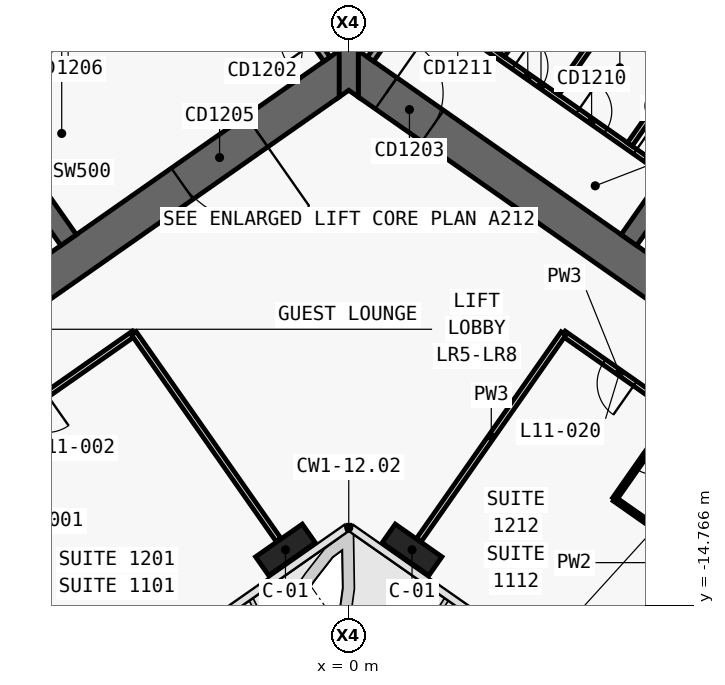
"""IFC4 building model, lengths in metres.
Left out: names, types, materials, properties, quantities, classifications, styles, units other than length and angle.
Written with IfcOpenShell. Run it as: python <this file> out.ifc"""

import sys

from ifc_helpers import new_model, si_unit, direction, frame, frame_2d, origin, origin_2d, place, context, subcontext, project, spatial, polyline, rectangle, outline, extrude, element, fill, save


model = new_model("IFC4")
c1 = context("Model", 3, precision=1e-05, world=origin(), true_north=direction((0.0, 1.0)))
c2 = subcontext(c1, "Body", "Model", "MODEL_VIEW")
j1 = project(units=[si_unit("LENGTHUNIT", "METRE"), si_unit("PLANEANGLEUNIT", "RADIAN")], contexts=[c1])
p1 = place(None, origin())
s1 = spatial("IfcSite", under=j1, at=p1, CompositionType="ELEMENT")
p2 = place(p1, origin())
s2 = spatial("IfcBuilding", under=s1, at=p2, CompositionType="ELEMENT")
p3 = place(p2, frame((0.0, 0.0, 65.3)))
s3 = spatial("IfcBuildingStorey", under=s2, at=p3, CompositionType="ELEMENT", Elevation=65.3)
p4 = place(p3, frame((0.037, 11.867, 0.0), z_axis=(0.0, 0.0, 1.0), x_axis=(-0.819155306259, -0.573571777746, 0.0)))
e1 = element("IfcWall", 1, at=p4, inside=s3, PredefinedType="SHEAR", context=c2, shape_type="SweptSolid", body=[
    extrude(outline(polyline([(33.837, 0.5), (0.7, 0.5), (0.0, -0.5), (33.837, -0.5), (33.837, 0.5)])), origin(), (0.0, 0.0, 1.0), 3.6),
])
p5 = place(p3, frame((0.037, -0.585, 0.0), z_axis=(0.0, 0.0, 1.0), x_axis=(-0.819157152511, -0.573569140985, 0.0)))
e2 = element("IfcWall", 2, at=p5, inside=s3, PredefinedType="SHEAR", context=c2, shape_type="SweptSolid", body=[
    extrude(outline(polyline([(26.695, 0.5), (0.7, 0.5), (0.0, -0.5), (26.695, -0.5), (26.695, 0.5)])), origin(), (0.0, 0.0, 1.0), 3.6),
])
p6 = place(p5, frame((2.995, 0.0, 0.0)))
e3 = element("IfcOpeningElement", 3, at=p6, cuts=e2, PredefinedType="OPENING", context=c2, shape_type="SweptSolid", body=[
    extrude(rectangle(XDim=2.4, YDim=2.1, at=frame_2d((1.2, 1.05))), frame((0.0, 0.51, 0.0), z_axis=(0.0, -1.0, 0.0), x_axis=(1.0, 0.0, 0.0)), (0.0, 0.0, 1.0), 1.02),
])
p7 = place(p5, frame((11.995, 0.0, 0.0)))
e4 = element("IfcOpeningElement", 4, at=p7, cuts=e2, PredefinedType="OPENING", context=c2, shape_type="SweptSolid", body=[
    extrude(rectangle(XDim=2.4, YDim=2.1, at=frame_2d((1.2, 1.05))), frame((0.0, 0.51, 0.0), z_axis=(0.0, -1.0, 0.0), x_axis=(1.0, 0.0, 0.0)), (0.0, 0.0, 1.0), 1.02),
])
p8 = place(p3, frame((-7.372, -5.162, 0.0), z_axis=(0.0, 0.0, 1.0), x_axis=(-0.573594173421, 0.819139624372, 0.0)))
e5 = element("IfcWall", 5, at=p8, inside=s3, PredefinedType="SHEAR", context=c2, shape_type="SweptSolid", body=[
    extrude(outline(polyline([(4.35, 0.25), (0.0, 0.25), (0.0, -0.25), (4.35, -0.25), (4.35, 0.25)])), origin(), (0.0, 0.0, 1.0), 3.6),
])
p9 = place(p3, frame((-2.638, 3.768, 0.0), z_axis=(0.0, 0.0, 1.0), x_axis=(-0.819148977158, -0.573580816643, 0.0)))
e6 = element("IfcWall", 6, at=p9, inside=s3, PredefinedType="SHEAR", context=c2, shape_type="SweptSolid", body=[
    extrude(outline(polyline([(26.0, 0.25), (0.0, 0.25), (0.0, -0.25), (26.0, -0.25), (26.0, 0.25)])), origin(), (0.0, 0.0, 1.0), 3.6),
])
p10 = place(p9, frame((1.169, 0.0, 0.0)))
e7 = element("IfcOpeningElement", 7, at=p10, cuts=e6, PredefinedType="OPENING", context=c2, shape_type="SweptSolid", body=[
    extrude(rectangle(XDim=1.1, YDim=2.1, at=frame_2d((0.55, 1.05))), frame((0.0, 0.26, 0.0), z_axis=(0.0, -1.0, 0.0), x_axis=(1.0, 0.0, 0.0)), (0.0, 0.0, 1.0), 0.52),
])
p11 = place(p9, frame((3.206, 0.0, 0.0)))
e8 = element("IfcOpeningElement", 8, at=p11, cuts=e6, PredefinedType="OPENING", context=c2, shape_type="SweptSolid", body=[
    extrude(rectangle(XDim=1.1, YDim=2.1, at=frame_2d((0.55, 1.05))), frame((0.0, 0.26, 0.0), z_axis=(0.0, -1.0, 0.0), x_axis=(1.0, 0.0, 0.0)), (0.0, 0.0, 1.0), 0.52),
])
p12 = place(p9, frame((5.244, 0.0, 0.0)))
e9 = element("IfcOpeningElement", 9, at=p12, cuts=e6, PredefinedType="OPENING", context=c2, shape_type="SweptSolid", body=[
    extrude(rectangle(XDim=1.1, YDim=2.1, at=frame_2d((0.55, 1.05))), frame((0.0, 0.26, 0.0), z_axis=(0.0, -1.0, 0.0), x_axis=(1.0, 0.0, 0.0)), (0.0, 0.0, 1.0), 0.52),
])
p13 = place(p9, frame((7.281, 0.0, 0.0)))
e10 = element("IfcOpeningElement", 10, at=p13, cuts=e6, PredefinedType="OPENING", context=c2, shape_type="SweptSolid", body=[
    extrude(rectangle(XDim=1.1, YDim=2.1, at=frame_2d((0.55, 1.05))), frame((0.0, 0.26, 0.0), z_axis=(0.0, -1.0, 0.0), x_axis=(1.0, 0.0, 0.0)), (0.0, 0.0, 1.0), 0.52),
])
p14 = place(p9, frame((9.688, 0.0, 0.0)))
e11 = element("IfcOpeningElement", 11, at=p14, cuts=e6, PredefinedType="OPENING", context=c2, shape_type="SweptSolid", body=[
    extrude(rectangle(XDim=1.1, YDim=2.1, at=frame_2d((0.55, 1.05))), frame((0.0, 0.26, 0.0), z_axis=(0.0, -1.0, 0.0), x_axis=(1.0, 0.0, 0.0)), (0.0, 0.0, 1.0), 0.52),
])
p15 = place(p9, frame((11.863, 0.0, 0.0)))
e12 = element("IfcOpeningElement", 12, at=p15, cuts=e6, PredefinedType="OPENING", context=c2, shape_type="SweptSolid", body=[
    extrude(rectangle(XDim=1.1, YDim=2.1, at=frame_2d((0.55, 1.05))), frame((0.0, 0.26, 0.0), z_axis=(0.0, -1.0, 0.0), x_axis=(1.0, 0.0, 0.0)), (0.0, 0.0, 1.0), 0.52),
])
p16 = place(p9, frame((14.038, 0.0, 0.0)))
e13 = element("IfcOpeningElement", 13, at=p16, cuts=e6, PredefinedType="OPENING", context=c2, shape_type="SweptSolid", body=[
    extrude(rectangle(XDim=1.1, YDim=2.1, at=frame_2d((0.55, 1.05))), frame((0.0, 0.26, 0.0), z_axis=(0.0, -1.0, 0.0), x_axis=(1.0, 0.0, 0.0)), (0.0, 0.0, 1.0), 0.52),
])
p17 = place(p9, frame((16.212, 0.0, 0.0)))
e14 = element("IfcOpeningElement", 14, at=p17, cuts=e6, PredefinedType="OPENING", context=c2, shape_type="SweptSolid", body=[
    extrude(rectangle(XDim=1.1, YDim=2.1, at=frame_2d((0.55, 1.05))), frame((0.0, 0.26, 0.0), z_axis=(0.0, -1.0, 0.0), x_axis=(1.0, 0.0, 0.0)), (0.0, 0.0, 1.0), 0.52),
])
p18 = place(p3, frame((-0.037, 11.867, 0.0), z_axis=(0.0, 0.0, 1.0), x_axis=(0.819155306259, -0.573571777746, 0.0)))
e15 = element("IfcWall", 15, at=p18, inside=s3, PredefinedType="SHEAR", context=c2, shape_type="SweptSolid", body=[
    extrude(outline(polyline([(33.837, 0.5), (0.0, 0.5), (0.7, -0.5), (33.837, -0.5), (33.837, 0.5)])), origin(), (0.0, 0.0, 1.0), 3.6),
])
p19 = place(p3, frame((-0.037, -0.585, 0.0), z_axis=(0.0, 0.0, 1.0), x_axis=(0.819157152511, -0.573569140985, 0.0)))
e16 = element("IfcWall", 16, at=p19, inside=s3, PredefinedType="SHEAR", context=c2, shape_type="SweptSolid", body=[
    extrude(outline(polyline([(26.695, 0.5), (0.0, 0.5), (0.7, -0.5), (26.695, -0.5), (26.695, 0.5)])), origin(), (0.0, 0.0, 1.0), 3.6),
])
p20 = place(p19, frame((1.245, 0.0, 0.0)))
e17 = element("IfcOpeningElement", 17, at=p20, cuts=e16, PredefinedType="OPENING", context=c2, shape_type="SweptSolid", body=[
    extrude(rectangle(XDim=1.5, YDim=2.1, at=frame_2d((0.75, 1.05))), frame((0.0, 0.51, 0.0), z_axis=(0.0, -1.0, 0.0), x_axis=(1.0, 0.0, 0.0)), (0.0, 0.0, 1.0), 1.02),
])
p21 = place(p19, frame((12.445, 0.0, 0.0)))
e18 = element("IfcOpeningElement", 18, at=p21, cuts=e16, PredefinedType="OPENING", context=c2, shape_type="SweptSolid", body=[
    extrude(rectangle(XDim=1.5, YDim=2.1, at=frame_2d((0.75, 1.05))), frame((0.0, 0.51, 0.0), z_axis=(0.0, -1.0, 0.0), x_axis=(1.0, 0.0, 0.0)), (0.0, 0.0, 1.0), 1.02),
])
p22 = place(p3, frame((7.372, -5.162, 0.0), z_axis=(0.0, 0.0, 1.0), x_axis=(0.573594173421, 0.819139624372, 0.0)))
e19 = element("IfcWall", 19, at=p22, inside=s3, PredefinedType="SHEAR", context=c2, shape_type="SweptSolid", body=[
    extrude(outline(polyline([(0.0, 0.25), (0.0, -0.25), (4.35, -0.25), (4.35, 0.25), (0.0, 0.25)])), origin(), (0.0, 0.0, 1.0), 3.6),
])
p23 = place(p3, frame((2.638, 3.768, 0.0), z_axis=(0.0, 0.0, 1.0), x_axis=(0.819148977158, -0.573580816643, 0.0)))
e20 = element("IfcWall", 20, at=p23, inside=s3, PredefinedType="SHEAR", context=c2, shape_type="SweptSolid", body=[
    extrude(outline(polyline([(0.0, 0.25), (0.0, -0.25), (26.0, -0.25), (26.0, 0.25), (0.0, 0.25)])), origin(), (0.0, 0.0, 1.0), 3.6),
])
p24 = place(p23, frame((9.637, 0.0, 0.0)))
e21 = element("IfcOpeningElement", 21, at=p24, cuts=e20, PredefinedType="OPENING", context=c2, shape_type="SweptSolid", body=[
    extrude(rectangle(XDim=1.2, YDim=2.1, at=frame_2d((0.6, 1.05))), frame((0.0, 0.26, 0.0), z_axis=(0.0, -1.0, 0.0), x_axis=(1.0, 0.0, 0.0)), (0.0, 0.0, 1.0), 0.52),
])
p25 = place(p23, frame((11.812, 0.0, 0.0)))
e22 = element("IfcOpeningElement", 22, at=p25, cuts=e20, PredefinedType="OPENING", context=c2, shape_type="SweptSolid", body=[
    extrude(rectangle(XDim=1.2, YDim=2.1, at=frame_2d((0.6, 1.05))), frame((0.0, 0.26, 0.0), z_axis=(0.0, -1.0, 0.0), x_axis=(1.0, 0.0, 0.0)), (0.0, 0.0, 1.0), 0.52),
])
p26 = place(p23, frame((13.988, 0.0, 0.0)))
e23 = element("IfcOpeningElement", 23, at=p26, cuts=e20, PredefinedType="OPENING", context=c2, shape_type="SweptSolid", body=[
    extrude(rectangle(XDim=1.2, YDim=2.1, at=frame_2d((0.6, 1.05))), frame((0.0, 0.26, 0.0), z_axis=(0.0, -1.0, 0.0), x_axis=(1.0, 0.0, 0.0)), (0.0, 0.0, 1.0), 0.52),
])
p27 = place(p23, frame((16.262, 0.0, 0.0)))
e24 = element("IfcOpeningElement", 24, at=p27, cuts=e20, PredefinedType="OPENING", context=c2, shape_type="SweptSolid", body=[
    extrude(rectangle(XDim=1.0, YDim=2.1, at=frame_2d((0.5, 1.05))), frame((0.0, 0.26, 0.0), z_axis=(0.0, -1.0, 0.0), x_axis=(1.0, 0.0, 0.0)), (0.0, 0.0, 1.0), 0.52),
])
p28 = place(p3, frame((0.0, -1.396, 0.0), z_axis=(0.0, 0.0, 1.0), x_axis=(0.0, 1.0, 0.0)))
e25 = element("IfcWall", 25, at=p28, inside=s3, PredefinedType="SHEAR", context=c2, shape_type="SweptSolid", body=[
    extrude(outline(polyline([(0.0, -0.25), (0.175, -0.25), (1.221, -0.25), (12.452, -0.25), (13.848, -0.25), (13.857, -0.25), (13.968, -0.172), (13.848, 0.0), (13.968, 0.172), (13.857, 0.25), (13.848, 0.25), (12.452, 0.25), (1.221, 0.25), (0.175, 0.25), (0.0, 0.25), (0.175, 0.0), (0.0, -0.25)])), origin(), (0.0, 0.0, 1.0), 3.6),
])
for number, where, z_axis, x_axis in (
    (26, (-1.665, -13.313, 0.0), (0.0, 0.0, 1.0), (-0.819, -0.574, 0.0)),
    (27, (1.665, -13.313, 0.0), (0.0, 0.0, 1.0), (0.819, -0.574, 0.0)),
):
    element("IfcColumn", number, at=place(p3, frame(where, z_axis=z_axis, x_axis=x_axis)), inside=s3, PredefinedType="COLUMN", context=c2, shape_type="SweptSolid", body=[
        extrude(rectangle(XDim=1.5, YDim=0.6, at=origin_2d()), origin(), (0.0, 0.0, 1.0), 3.6),
    ])
p29 = place(p3, frame((1.802, 1.179, 0.0), z_axis=(0.0, 0.0, 1.0), x_axis=(0.819142461705, -0.573590121456, 0.0)))
e28 = element("IfcWall", 28, at=p29, inside=s3, PredefinedType="PARTITIONING", context=c2, shape_type="SweptSolid", body=[
    extrude(rectangle(XDim=7.95, YDim=0.15, at=frame_2d((3.975, 0.0))), origin(), (0.0, 0.0, 1.0), 3.32),
])
p30 = place(p29, frame((0.85, 0.0, 0.0)))
e29 = element("IfcOpeningElement", 29, at=p30, cuts=e28, PredefinedType="OPENING", context=c2, shape_type="SweptSolid", body=[
    extrude(rectangle(XDim=0.9, YDim=2.1, at=frame_2d((0.45, 1.05))), frame((0.0, 0.085, 0.0), z_axis=(0.0, -1.0, 0.0), x_axis=(1.0, 0.0, 0.0)), (0.0, 0.0, 1.0), 0.17),
])
p31 = place(p29, frame((3.1, 0.0, 0.0)))
e30 = element("IfcOpeningElement", 30, at=p31, cuts=e28, PredefinedType="OPENING", context=c2, shape_type="SweptSolid", body=[
    extrude(rectangle(XDim=0.9, YDim=2.1, at=frame_2d((0.45, 1.05))), frame((0.0, 0.085, 0.0), z_axis=(0.0, -1.0, 0.0), x_axis=(1.0, 0.0, 0.0)), (0.0, 0.0, 1.0), 0.17),
])
p32 = place(p29, frame((5.15, 0.0, 0.0)))
e31 = element("IfcOpeningElement", 31, at=p32, cuts=e28, PredefinedType="OPENING", context=c2, shape_type="SweptSolid", body=[
    extrude(rectangle(XDim=0.9, YDim=2.1, at=frame_2d((0.45, 1.05))), frame((0.0, 0.085, 0.0), z_axis=(0.0, -1.0, 0.0), x_axis=(1.0, 0.0, 0.0)), (0.0, 0.0, 1.0), 0.17),
])
p33 = place(p29, frame((7.0, 0.0, 0.0)))
e32 = element("IfcOpeningElement", 32, at=p33, cuts=e28, PredefinedType="OPENING", context=c2, shape_type="SweptSolid", body=[
    extrude(rectangle(XDim=0.8, YDim=2.1, at=frame_2d((0.4, 1.05))), frame((0.0, 0.085, 0.0), z_axis=(0.0, -1.0, 0.0), x_axis=(1.0, 0.0, 0.0)), (0.0, 0.0, 1.0), 0.17),
])
for number, where, z_axis, x_axis in (
    (33, (4.037, -0.293, 0.0), (0.0, 0.0, 1.0), (0.574, 0.819, 0.0)),
    (34, (5.47, -1.297, 0.0), (0.0, 0.0, 1.0), (0.574, 0.819, 0.0)),
    (35, (7.395, -2.645, 0.0), (0.0, 0.0, 1.0), (0.574, 0.819, 0.0)),
):
    element("IfcWall", number, at=place(p3, frame(where, z_axis=z_axis, x_axis=x_axis)), inside=s3, PredefinedType="PARTITIONING", context=c2, shape_type="SweptSolid", body=[
        extrude(rectangle(XDim=2.275, YDim=0.15, at=frame_2d((1.137, 0.0))), origin(), (0.0, 0.0, 1.0), 3.32),
    ])
p34 = place(p3, frame((-0.573, -0.402, 0.0), z_axis=(0.0, 0.0, 1.0), x_axis=(-0.57356780395, 0.819158088694, 0.0)))
e36 = element("IfcWall", 36, at=p34, inside=s3, PredefinedType="SOLIDWALL", context=c2, shape_type="SweptSolid", body=[
    extrude(rectangle(XDim=4.35, YDim=0.2, at=frame_2d((2.175, 0.0))), origin(), (0.0, 0.0, 1.0), 3.32),
])
p35 = place(p34, frame((0.55, 0.0, 0.0)))
e37 = element("IfcOpeningElement", 37, at=p35, cuts=e36, PredefinedType="OPENING", context=c2, shape_type="SweptSolid", body=[
    extrude(rectangle(XDim=0.9, YDim=2.1, at=frame_2d((0.45, 1.05))), frame((0.0, 0.11, 0.0), z_axis=(0.0, -1.0, 0.0), x_axis=(1.0, 0.0, 0.0)), (0.0, 0.0, 1.0), 0.22),
])
p36 = place(p3, frame((0.573, -0.402, 0.0), z_axis=(0.0, 0.0, 1.0), x_axis=(0.57356780395, 0.819158088694, 0.0)))
e38 = element("IfcWall", 38, at=p36, inside=s3, PredefinedType="SOLIDWALL", context=c2, shape_type="SweptSolid", body=[
    extrude(rectangle(XDim=4.35, YDim=0.2, at=frame_2d((2.175, 0.0))), origin(), (0.0, 0.0, 1.0), 3.32),
])
p37 = place(p36, frame((0.55, 0.0, 0.0)))
e39 = element("IfcOpeningElement", 39, at=p37, cuts=e38, PredefinedType="OPENING", context=c2, shape_type="SweptSolid", body=[
    extrude(rectangle(XDim=0.9, YDim=2.1, at=frame_2d((0.45, 1.05))), frame((0.0, 0.11, 0.0), z_axis=(0.0, -1.0, 0.0), x_axis=(1.0, 0.0, 0.0)), (0.0, 0.0, 1.0), 0.22),
])
p38 = place(p3, frame((8.601, -9.685, 0.0), z_axis=(0.0, 0.0, 1.0), x_axis=(-0.819149096931, 0.573580645591, 0.0)))
e40 = element("IfcWall", 40, at=p38, inside=s3, PredefinedType="PARTITIONING", context=c2, shape_type="SweptSolid", body=[
    extrude(rectangle(XDim=3.601, YDim=0.15, at=frame_2d((1.8, 0.0))), origin(), (0.0, 0.0, 1.0), 2.6),
])
p39 = place(p38, frame((1.301, 0.0, 0.0)))
e41 = element("IfcOpeningElement", 41, at=p39, cuts=e40, PredefinedType="OPENING", context=c2, shape_type="SweptSolid", body=[
    extrude(rectangle(XDim=1.0, YDim=2.1, at=frame_2d((0.5, 1.05))), frame((0.0, 0.085, 0.0), z_axis=(0.0, -1.0, 0.0), x_axis=(1.0, 0.0, 0.0)), (0.0, 0.0, 1.0), 0.17),
])
p40 = place(p3, frame((-5.652, -7.62, 0.0), z_axis=(0.0, 0.0, 1.0), x_axis=(-0.819155459934, -0.573571558274, 0.0)))
e42 = element("IfcWall", 42, at=p40, inside=s3, PredefinedType="PARTITIONING", context=c2, shape_type="SweptSolid", body=[
    extrude(rectangle(XDim=6.601, YDim=0.15, at=frame_2d((3.301, 0.0))), origin(), (0.0, 0.0, 1.0), 2.6),
])
p41 = place(p40, frame((2.8, 0.0, 0.0)))
e43 = element("IfcOpeningElement", 43, at=p41, cuts=e42, PredefinedType="OPENING", context=c2, shape_type="SweptSolid", body=[
    extrude(rectangle(XDim=1.0, YDim=2.1, at=frame_2d((0.5, 1.05))), frame((0.0, 0.085, 0.0), z_axis=(0.0, -1.0, 0.0), x_axis=(1.0, 0.0, 0.0)), (0.0, 0.0, 1.0), 0.17),
])
p42 = place(p3, frame((8.6, -9.684, 0.0), z_axis=(0.0, 0.0, 1.0), x_axis=(-0.573550118428, -0.819170471667, 0.0)))
e44 = element("IfcWall", 44, at=p42, inside=s3, PredefinedType="PARTITIONING", context=c2, shape_type="SweptSolid", body=[
    extrude(rectangle(XDim=2.8, YDim=0.12, at=frame_2d((1.4, 0.0))), origin(), (0.0, 0.0, 1.0), 3.32),
])
p43 = place(p42, frame((0.975, 0.0, 0.0)))
e45 = element("IfcOpeningElement", 45, at=p43, cuts=e44, PredefinedType="OPENING", context=c2, shape_type="SweptSolid", body=[
    extrude(rectangle(XDim=0.85, YDim=2.05, at=frame_2d((0.425, 1.025))), frame((0.0, 0.07, 0.0), z_axis=(0.0, -1.0, 0.0), x_axis=(1.0, 0.0, 0.0)), (0.0, 0.0, 1.0), 0.14),
])
p44 = place(p3, frame((6.994, -11.979, 0.0), z_axis=(0.0, 0.0, 1.0), x_axis=(0.819188907105, -0.573523787192, 0.0)))
e46 = element("IfcWall", 46, at=p44, inside=s3, PredefinedType="PARTITIONING", context=c2, shape_type="SweptSolid", body=[
    extrude(rectangle(XDim=2.4, YDim=0.12, at=frame_2d((1.2, 0.0))), origin(), (0.0, 0.0, 1.0), 3.32),
])
p45 = place(p3, frame((8.96, -13.355, 0.0), z_axis=(0.0, 0.0, 1.0), x_axis=(-0.573564311442, -0.819160534108, 0.0)))
e47 = element("IfcWall", 47, at=p45, inside=s3, PredefinedType="PARTITIONING", context=c2, shape_type="SweptSolid", body=[
    extrude(rectangle(XDim=4.499, YDim=0.15, at=frame_2d((2.25, 0.0))), origin(), (0.0, 0.0, 1.0), 2.5),
])
p46 = place(p3, frame((1.849, -13.051, 0.0), z_axis=(0.0, 0.0, 1.0), x_axis=(0.57357355307, 0.819154063177, 0.0)))
e48 = element("IfcWall", 48, at=p46, inside=s3, PredefinedType="PARTITIONING", context=c2, shape_type="SweptSolid", body=[
    extrude(rectangle(XDim=6.63, YDim=0.15, at=frame_2d((3.315, 0.0))), origin(), (0.0, 0.0, 1.0), 2.6),
])
p47 = place(p3, frame((-1.849, -13.051, 0.0), z_axis=(0.0, 0.0, 1.0), x_axis=(-0.573575988258, 0.819152358047, 0.0)))
e49 = element("IfcWall", 49, at=p47, inside=s3, PredefinedType="PARTITIONING", context=c2, shape_type="SweptSolid", body=[
    extrude(rectangle(XDim=6.632, YDim=0.15, at=frame_2d((3.316, 0.0))), origin(), (0.0, 0.0, 1.0), 2.6),
])
p48 = place(p6, origin())
e50 = element("IfcDoor", 50, at=p48, inside=s3, OperationType="DOUBLE_DOOR_SINGLE_SWING", PredefinedType="DOOR", context=c2, shape_type="SweptSolid", body=[
    extrude(rectangle(XDim=2.4, YDim=2.1, at=frame_2d((1.2, 1.05))), frame((0.0, 0.025, 0.0), z_axis=(0.0, -1.0, 0.0), x_axis=(1.0, 0.0, 0.0)), (0.0, 0.0, 1.0), 0.05),
])
fill(e3, e50)
p49 = place(p31, origin())
e51 = element("IfcDoor", 51, at=p49, inside=s3, OperationType="SINGLE_SWING_RIGHT", PredefinedType="DOOR", context=c2, shape_type="SweptSolid", body=[
    extrude(rectangle(XDim=0.9, YDim=2.1, at=frame_2d((0.45, 1.05))), frame((0.0, 0.025, 0.0), z_axis=(0.0, -1.0, 0.0), x_axis=(1.0, 0.0, 0.0)), (0.0, 0.0, 1.0), 0.05),
])
fill(e30, e51)
p50 = place(p32, origin())
e52 = element("IfcDoor", 52, at=p50, inside=s3, OperationType="SINGLE_SWING_RIGHT", PredefinedType="DOOR", context=c2, shape_type="SweptSolid", body=[
    extrude(rectangle(XDim=0.9, YDim=2.1, at=frame_2d((0.45, 1.05))), frame((0.0, 0.025, 0.0), z_axis=(0.0, -1.0, 0.0), x_axis=(1.0, 0.0, 0.0)), (0.0, 0.0, 1.0), 0.05),
])
fill(e31, e52)
p51 = place(p33, origin())
e53 = element("IfcDoor", 53, at=p51, inside=s3, OperationType="SINGLE_SWING_RIGHT", PredefinedType="DOOR", context=c2, shape_type="SweptSolid", body=[
    extrude(rectangle(XDim=0.8, YDim=2.1, at=frame_2d((0.4, 1.05))), frame((0.0, 0.025, 0.0), z_axis=(0.0, -1.0, 0.0), x_axis=(1.0, 0.0, 0.0)), (0.0, 0.0, 1.0), 0.05),
])
fill(e32, e53)
p52 = place(p20, origin())
e54 = element("IfcDoor", 54, at=p52, inside=s3, OperationType="SINGLE_SWING_RIGHT", PredefinedType="DOOR", context=c2, shape_type="SweptSolid", body=[
    extrude(rectangle(XDim=1.5, YDim=2.1, at=frame_2d((0.75, 1.05))), frame((0.0, 0.025, 0.0), z_axis=(0.0, -1.0, 0.0), x_axis=(1.0, 0.0, 0.0)), (0.0, 0.0, 1.0), 0.05),
])
fill(e17, e54)
p53 = place(p43, origin())
e55 = element("IfcDoor", 55, at=p53, inside=s3, OperationType="SINGLE_SWING_LEFT", PredefinedType="DOOR", context=c2, shape_type="SweptSolid", body=[
    extrude(rectangle(XDim=0.85, YDim=2.05, at=frame_2d((0.425, 1.025))), frame((0.0, 0.025, 0.0), z_axis=(0.0, -1.0, 0.0), x_axis=(1.0, 0.0, 0.0)), (0.0, 0.0, 1.0), 0.05),
])
fill(e45, e55)
p54 = place(p39, origin())
e56 = element("IfcDoor", 56, at=p54, inside=s3, OperationType="SINGLE_SWING_RIGHT", PredefinedType="DOOR", context=c2, shape_type="SweptSolid", body=[
    extrude(rectangle(XDim=1.0, YDim=2.1, at=frame_2d((0.5, 1.05))), frame((0.0, 0.025, 0.0), z_axis=(0.0, -1.0, 0.0), x_axis=(1.0, 0.0, 0.0)), (0.0, 0.0, 1.0), 0.05),
])
fill(e41, e56)
save(model, sys.argv[1])
